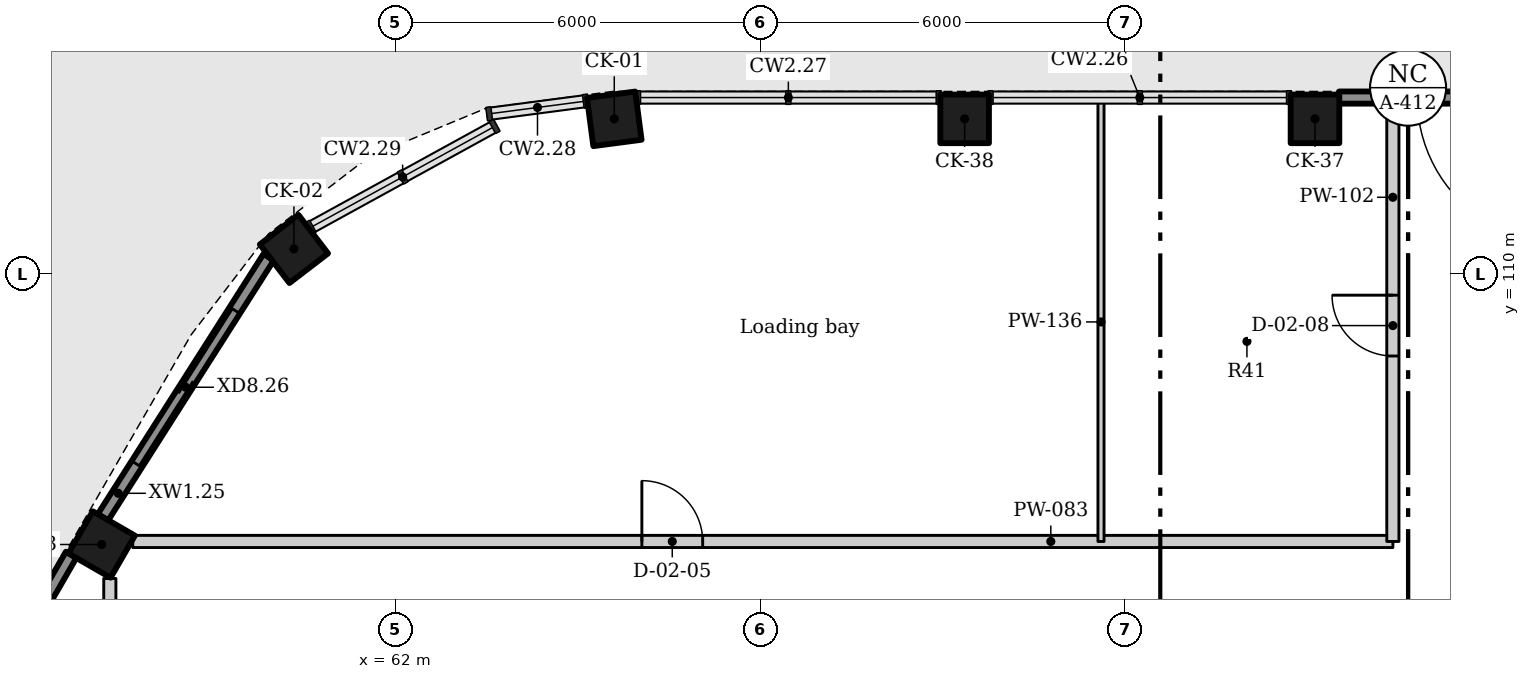
"""IFC4 building model, lengths in metres.
Left out: names, types, materials, properties, quantities, classifications, styles, units other than length and angle.
Written with IfcOpenShell. Run it as: python <this file> out.ifc"""

import sys

from ifc_helpers import new_model, si_unit, direction, frame, frame_2d, origin, origin_2d, place, context, subcontext, project, spatial, rectangle, extrude, element, fill, save


model = new_model("IFC4")
c1 = context("Model", 3, precision=1e-05, world=origin(), true_north=direction((0.0, 1.0)))
c2 = subcontext(c1, "Body", "Model", "MODEL_VIEW")
j1 = project(units=[si_unit("LENGTHUNIT", "METRE"), si_unit("PLANEANGLEUNIT", "RADIAN")], contexts=[c1])
p1 = place(None, origin())
s1 = spatial("IfcSite", under=j1, at=p1, CompositionType="ELEMENT")
p2 = place(p1, origin())
s2 = spatial("IfcBuilding", under=s1, at=p2, CompositionType="ELEMENT")
p3 = place(p2, origin())
s3 = spatial("IfcBuildingStorey", under=s2, at=p3, CompositionType="ELEMENT", Elevation=0.0)
for number, where, z_axis, x_axis in (
    (1, (65.596, 112.55, -1.8), (0.0, 0.0, 1.0), (-0.991, -0.131, 0.0)),
    (2, (60.328, 110.411, -1.8), (0.0, 0.0, 1.0), (-0.793, -0.609, 0.0)),
    (3, (57.166, 105.55, -1.8), (0.0, 0.0, 1.0), (-0.5, -0.866, 0.0)),
    (4, (77.119, 112.55, -1.8), (0.0, 0.0, 1.0), (-1.0, 0.0, 0.0)),
    (5, (71.357, 112.55, -1.8), (0.0, 0.0, 1.0), (-1.0, 0.0, 0.0)),
):
    element("IfcColumn", number, at=place(p3, frame(where, z_axis=z_axis, x_axis=x_axis)), inside=s3, PredefinedType="COLUMN", context=c2, shape_type="SweptSolid", body=[
        extrude(rectangle(XDim=0.8, YDim=0.8, at=origin_2d()), origin(), (0.0, 0.0, 1.0), 8.4),
    ])
p4 = place(p3, frame((56.665, 105.382, 0.0), z_axis=(0.0, 0.0, 1.0), x_axis=(-0.500011252833, -0.866018906861, 0.0)))
e6 = element("IfcWall", 6, at=p4, inside=s3, PredefinedType="SOLIDWALL", context=c2, shape_type="SweptSolid", body=[
    extrude(rectangle(XDim=5.025, YDim=0.2, at=frame_2d((2.512, 0.0))), origin(), (0.0, 0.0, 1.0), 5.4),
])
p5 = place(p4, frame((1.312, 0.0, 0.0)))
e7 = element("IfcOpeningElement", 7, at=p5, cuts=e6, PredefinedType="OPENING", context=c2, shape_type="SweptSolid", body=[
    extrude(rectangle(XDim=2.4, YDim=2.7, at=frame_2d((1.2, 1.35))), frame((0.0, 0.11, 0.0), z_axis=(0.0, -1.0, 0.0), x_axis=(1.0, 0.0, 0.0)), (0.0, 0.0, 1.0), 0.22),
])
p6 = place(p3, frame((82.485, 112.9, 0.0), z_axis=(0.0, 0.0, 1.0), x_axis=(-1.0, 0.0, 0.0)))
e8 = element("IfcWall", 8, at=p6, inside=s3, PredefinedType="SOLIDWALL", context=c2, shape_type="SweptSolid", body=[
    extrude(rectangle(XDim=4.97, YDim=0.2, at=frame_2d((2.485, 0.0))), origin(), (0.0, 0.0, 1.0), 5.4),
])
p7 = place(p6, frame((1.285, 0.0, 0.0)))
e9 = element("IfcOpeningElement", 9, at=p7, cuts=e8, PredefinedType="OPENING", context=c2, shape_type="SweptSolid", body=[
    extrude(rectangle(XDim=2.4, YDim=2.7, at=frame_2d((1.2, 1.35))), frame((0.0, 0.11, 0.0), z_axis=(0.0, -1.0, 0.0), x_axis=(1.0, 0.0, 0.0)), (0.0, 0.0, 1.0), 0.22),
])
p8 = place(p3, frame((59.911, 110.274, 0.0), z_axis=(0.0, 0.0, 1.0), x_axis=(-0.537224370512, -0.843439372882, 0.0)))
e10 = element("IfcWall", 10, at=p8, inside=s3, PredefinedType="SOLIDWALL", context=c2, shape_type="SweptSolid", body=[
    extrude(rectangle(XDim=5.071, YDim=0.2, at=frame_2d((2.535, 0.0))), origin(), (0.0, 0.0, 1.0), 5.4),
])
p9 = place(p8, frame((1.035, 0.0, 0.0)))
e11 = element("IfcOpeningElement", 11, at=p9, cuts=e10, PredefinedType="OPENING", context=c2, shape_type="SweptSolid", body=[
    extrude(rectangle(XDim=3.0, YDim=3.0, at=frame_2d((1.5, 1.5))), frame((0.0, 0.11, 0.0), z_axis=(0.0, -1.0, 0.0), x_axis=(1.0, 0.0, 0.0)), (0.0, 0.0, 1.0), 0.22),
])
p10 = place(p3, frame((57.677, 105.6, 0.0), z_axis=(0.0, 0.0, 1.0), x_axis=(1.0, 0.0, 0.0)))
e12 = element("IfcWall", 12, at=p10, inside=s3, PredefinedType="PARTITIONING", context=c2, shape_type="SweptSolid", body=[
    extrude(rectangle(XDim=20.723, YDim=0.2, at=frame_2d((10.362, 0.0))), origin(), (0.0, 0.0, 1.0), 6.3),
])
p11 = place(p10, frame((8.373, 0.0, 0.0)))
e13 = element("IfcOpeningElement", 13, at=p11, cuts=e12, PredefinedType="OPENING", context=c2, shape_type="SweptSolid", body=[
    extrude(rectangle(XDim=1.0, YDim=2.1, at=frame_2d((0.5, 1.05))), frame((0.0, 0.11, 0.0), z_axis=(0.0, -1.0, 0.0), x_axis=(1.0, 0.0, 0.0)), (0.0, 0.0, 1.0), 0.22),
])
p12 = place(p3, frame((57.3, 98.447, 0.0), z_axis=(0.0, 0.0, 1.0), x_axis=(0.0, 1.0, 0.0)))
e14 = element("IfcWall", 14, at=p12, inside=s3, PredefinedType="PARTITIONING", context=c2, shape_type="SweptSolid", body=[
    extrude(rectangle(XDim=6.544, YDim=0.2, at=frame_2d((3.272, 0.0))), origin(), (0.0, 0.0, 1.0), 6.3),
])
p13 = place(p12, frame((2.772, 0.0, 0.0)))
e15 = element("IfcOpeningElement", 15, at=p13, cuts=e14, PredefinedType="OPENING", context=c2, shape_type="SweptSolid", body=[
    extrude(rectangle(XDim=1.0, YDim=2.1, at=frame_2d((0.5, 1.05))), frame((0.0, 0.11, 0.0), z_axis=(0.0, -1.0, 0.0), x_axis=(1.0, 0.0, 0.0)), (0.0, 0.0, 1.0), 0.22),
])
p14 = place(p3, frame((78.4, 105.6, 0.0), z_axis=(0.0, 0.0, 1.0), x_axis=(0.0, 1.0, 0.0)))
e16 = element("IfcWall", 16, at=p14, inside=s3, PredefinedType="PARTITIONING", context=c2, shape_type="SweptSolid", body=[
    extrude(rectangle(XDim=7.17, YDim=0.2, at=frame_2d((3.585, 0.0))), origin(), (0.0, 0.0, 1.0), 5.53),
])
p15 = place(p14, frame((3.05, 0.0, 0.0)))
e17 = element("IfcOpeningElement", 17, at=p15, cuts=e16, PredefinedType="OPENING", context=c2, shape_type="SweptSolid", body=[
    extrude(rectangle(XDim=1.0, YDim=2.1, at=frame_2d((0.5, 1.05))), frame((0.0, 0.11, 0.0), z_axis=(0.0, -1.0, 0.0), x_axis=(1.0, 0.0, 0.0)), (0.0, 0.0, 1.0), 0.22),
])
p16 = place(p3, frame((73.6, 105.6, 0.0), z_axis=(0.0, 0.0, 1.0), x_axis=(0.0, 1.0, 0.0)))
e18 = element("IfcWall", 18, at=p16, inside=s3, PredefinedType="PARTITIONING", context=c2, shape_type="SweptSolid", body=[
    extrude(rectangle(XDim=7.22, YDim=0.1, at=frame_2d((3.61, 0.0))), origin(), (0.0, 0.0, 1.0), 5.53),
])
p17 = place(p7, frame((2.4, 0.0, 0.0), z_axis=(0.0, 0.0, 1.0), x_axis=(-1.0, 0.0, 0.0)))
e19 = element("IfcDoor", 19, at=p17, inside=s3, OperationType="DOUBLE_DOOR_DOUBLE_SWING", PredefinedType="DOOR", context=c2, shape_type="SweptSolid", body=[
    extrude(rectangle(XDim=2.4, YDim=2.7, at=frame_2d((1.2, 1.35))), frame((0.0, 0.025, 0.0), z_axis=(0.0, -1.0, 0.0), x_axis=(1.0, 0.0, 0.0)), (0.0, 0.0, 1.0), 0.05),
])
fill(e9, e19)
p18 = place(p9, origin())
e20 = element("IfcDoor", 20, at=p18, inside=s3, OperationType="ROLLINGUP", PredefinedType="GATE", context=c2, shape_type="SweptSolid", body=[
    extrude(rectangle(XDim=3.0, YDim=3.0, at=frame_2d((1.5, 1.5))), frame((0.0, 0.025, 0.0), z_axis=(0.0, -1.0, 0.0), x_axis=(1.0, 0.0, 0.0)), (0.0, 0.0, 1.0), 0.05),
])
fill(e11, e20)
p19 = place(p11, origin())
e21 = element("IfcDoor", 21, at=p19, inside=s3, OperationType="SINGLE_SWING_LEFT", PredefinedType="DOOR", context=c2, shape_type="SweptSolid", body=[
    extrude(rectangle(XDim=1.0, YDim=2.1, at=frame_2d((0.5, 1.05))), frame((0.0, 0.025, 0.0), z_axis=(0.0, -1.0, 0.0), x_axis=(1.0, 0.0, 0.0)), (0.0, 0.0, 1.0), 0.05),
])
fill(e13, e21)
p20 = place(p15, origin())
e22 = element("IfcDoor", 22, at=p20, inside=s3, OperationType="SINGLE_SWING_RIGHT", PredefinedType="DOOR", context=c2, shape_type="SweptSolid", body=[
    extrude(rectangle(XDim=1.0, YDim=2.1, at=frame_2d((0.5, 1.05))), frame((0.0, 0.025, 0.0), z_axis=(0.0, -1.0, 0.0), x_axis=(1.0, 0.0, 0.0)), (0.0, 0.0, 1.0), 0.05),
])
fill(e17, e22)
save(model, sys.argv[1])
